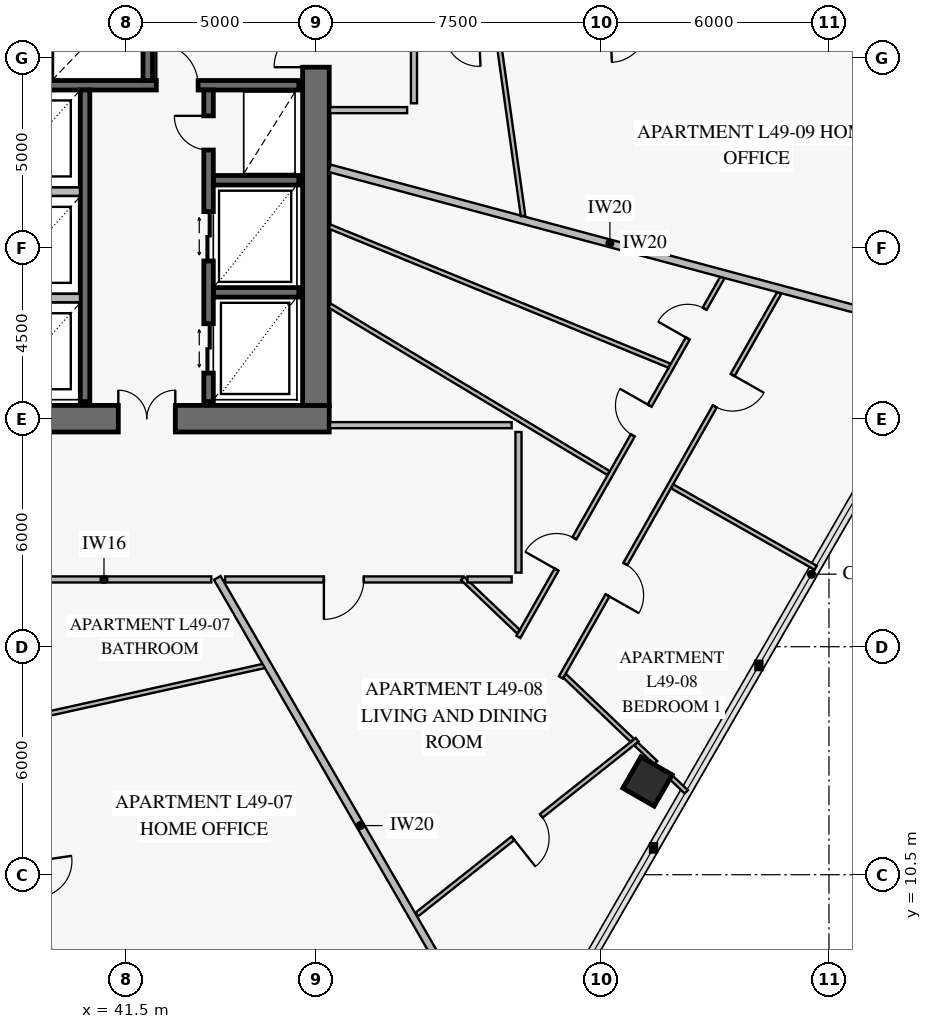
"""IFC4 building model, lengths in metres.
Left out: names, types, materials, properties, quantities, classifications, styles, units other than length and angle.
Written with IfcOpenShell. Run it as: python <this file> out.ifc"""

import sys

from ifc_helpers import new_model, si_unit, direction, frame, frame_2d, origin, origin_2d, place, context, subcontext, project, spatial, rectangle, extrude, element, fill, save


model = new_model("IFC4")
c1 = context("Model", 3, precision=1e-05, world=origin(), true_north=direction((0.0, 1.0)))
c2 = subcontext(c1, "Body", "Model", "MODEL_VIEW")
j1 = project(units=[si_unit("LENGTHUNIT", "METRE"), si_unit("PLANEANGLEUNIT", "RADIAN")], contexts=[c1])
p1 = place(None, origin())
s1 = spatial("IfcSite", under=j1, at=p1, CompositionType="ELEMENT")
p2 = place(p1, origin())
s2 = spatial("IfcBuilding", under=s1, at=p2, CompositionType="ELEMENT")
p3 = place(p2, frame((0.0, 0.0, 196.0)))
s3 = spatial("IfcBuildingStorey", under=s2, at=p3, CompositionType="ELEMENT", Elevation=196.0)
p4 = place(p3, frame((37.35, 22.5, 0.0), z_axis=(0.0, 0.0, 1.0), x_axis=(1.0, 0.0, 0.0)))
e1 = element("IfcWall", 1, at=p4, inside=s3, PredefinedType="SHEAR", context=c2, shape_type="SweptSolid", body=[
    extrude(rectangle(XDim=9.5, YDim=0.7, at=frame_2d((4.75, 0.0))), origin(), (0.0, 0.0, 1.0), 3.8),
])
p5 = place(p4, frame((3.95, 0.0, 0.0)))
e2 = element("IfcOpeningElement", 2, at=p5, cuts=e1, PredefinedType="OPENING", context=c2, shape_type="SweptSolid", body=[
    extrude(rectangle(XDim=1.5, YDim=2.15, at=frame_2d((0.75, 1.075))), frame((0.0, 0.362, 0.0), z_axis=(0.0, -1.0, 0.0), x_axis=(1.0, 0.0, 0.0)), (0.0, 0.0, 1.0), 0.724),
])
p6 = place(p3, frame((46.5, 22.85, 0.0), z_axis=(0.0, 0.0, 1.0), x_axis=(0.0, 1.0, 0.0)))
e3 = element("IfcWall", 3, at=p6, inside=s3, PredefinedType="SHEAR", context=c2, shape_type="SweptSolid", body=[
    extrude(rectangle(XDim=18.3, YDim=0.7, at=frame_2d((9.15, 0.0))), origin(), (0.0, 0.0, 1.0), 3.8),
])
p7 = place(p6, frame((8.9, 0.0, 0.0)))
e4 = element("IfcOpeningElement", 4, at=p7, cuts=e3, PredefinedType="OPENING", context=c2, shape_type="SweptSolid", body=[
    extrude(rectangle(XDim=1.1, YDim=2.15, at=frame_2d((0.55, 1.075))), frame((0.0, 0.362, 0.0), z_axis=(0.0, -1.0, 0.0), x_axis=(1.0, 0.0, 0.0)), (0.0, 0.0, 1.0), 0.724),
])
p8 = place(p3, frame((55.226, 12.953, 0.0), z_axis=(0.0, 0.0, 1.0), x_axis=(0.5, 0.866025403784, 0.0)))
e5 = element("IfcColumn", 5, at=p8, inside=s3, PredefinedType="COLUMN", context=c2, shape_type="SweptSolid", body=[
    extrude(rectangle(XDim=0.95, YDim=0.95, at=origin_2d()), origin(), (0.0, 0.0, 1.0), 3.55),
])
p9 = place(p3, frame((25.95, 31.275, 0.0), z_axis=(0.0, 0.0, 1.0), x_axis=(1.0, 0.0, 0.0)))
e6 = element("IfcWall", 6, at=p9, inside=s3, PredefinedType="SOLIDWALL", context=c2, shape_type="SweptSolid", body=[
    extrude(rectangle(XDim=20.1, YDim=0.25, at=frame_2d((10.05, 0.0))), origin(), (0.0, 0.0, 1.0), 3.8),
])
p10 = place(p9, frame((2.6, 0.0, 0.0)))
e7 = element("IfcOpeningElement", 7, at=p10, cuts=e6, PredefinedType="OPENING", context=c2, shape_type="SweptSolid", body=[
    extrude(rectangle(XDim=1.1, YDim=2.15, at=frame_2d((0.55, 1.075))), frame((0.0, 0.137, 0.0), z_axis=(0.0, -1.0, 0.0), x_axis=(1.0, 0.0, 0.0)), (0.0, 0.0, 1.0), 0.274),
])
p11 = place(p9, frame((10.6, 0.0, 0.0)))
e8 = element("IfcOpeningElement", 8, at=p11, cuts=e6, PredefinedType="OPENING", context=c2, shape_type="SweptSolid", body=[
    extrude(rectangle(XDim=1.1, YDim=2.15, at=frame_2d((0.55, 1.075))), frame((0.0, 0.137, 0.0), z_axis=(0.0, -1.0, 0.0), x_axis=(1.0, 0.0, 0.0)), (0.0, 0.0, 1.0), 0.274),
])
p12 = place(p9, frame((16.35, 0.0, 0.0)))
e9 = element("IfcOpeningElement", 9, at=p12, cuts=e6, PredefinedType="OPENING", context=c2, shape_type="SweptSolid", body=[
    extrude(rectangle(XDim=1.1, YDim=2.15, at=frame_2d((0.55, 1.075))), frame((0.0, 0.137, 0.0), z_axis=(0.0, -1.0, 0.0), x_axis=(1.0, 0.0, 0.0)), (0.0, 0.0, 1.0), 0.274),
])
p13 = place(p3, frame((42.075, 31.4, 0.0), z_axis=(0.0, 0.0, 1.0), x_axis=(0.0, 1.0, 0.0)))
e10 = element("IfcWall", 10, at=p13, inside=s3, PredefinedType="SOLIDWALL", context=c2, shape_type="SweptSolid", body=[
    extrude(rectangle(XDim=9.7, YDim=0.25, at=frame_2d((4.85, 0.0))), origin(), (0.0, 0.0, 1.0), 3.8),
])
p14 = place(p3, frame((40.425, 22.95, 0.0), z_axis=(0.0, 0.0, 1.0), x_axis=(0.0, 1.0, 0.0)))
e11 = element("IfcWall", 11, at=p14, inside=s3, PredefinedType="SOLIDWALL", context=c2, shape_type="SweptSolid", body=[
    extrude(rectangle(XDim=8.2, YDim=0.25, at=frame_2d((4.1, 0.0))), origin(), (0.0, 0.0, 1.0), 3.8),
])
for number, where, z_axis, x_axis in (
    (12, (43.8, 25.825, 0.0), (0.0, 0.0, 1.0), (1.0, 0.0, 0.0)),
    (13, (43.8, 28.775, 0.0), (0.0, 0.0, 1.0), (1.0, 0.0, 0.0)),
):
    element("IfcWall", number, at=place(p3, frame(where, z_axis=z_axis, x_axis=x_axis)), inside=s3, PredefinedType="SOLIDWALL", context=c2, shape_type="SweptSolid", body=[
        extrude(rectangle(XDim=2.25, YDim=0.25, at=frame_2d((1.125, 0.0))), origin(), (0.0, 0.0, 1.0), 3.8),
    ])
p15 = place(p3, frame((43.675, 22.95, 0.0), z_axis=(0.0, 0.0, 1.0), x_axis=(0.0, 1.0, 0.0)))
e14 = element("IfcWall", 14, at=p15, inside=s3, PredefinedType="SOLIDWALL", context=c2, shape_type="SweptSolid", body=[
    extrude(rectangle(XDim=8.2, YDim=0.25, at=frame_2d((4.1, 0.0))), origin(), (0.0, 0.0, 1.0), 3.8),
])
p16 = place(p15, frame((0.75, 0.0, 0.0)))
e15 = element("IfcOpeningElement", 15, at=p16, cuts=e14, PredefinedType="OPENING", context=c2, shape_type="SweptSolid", body=[
    extrude(rectangle(XDim=1.3, YDim=2.3, at=frame_2d((0.65, 1.15))), frame((0.0, 0.137, 0.0), z_axis=(0.0, -1.0, 0.0), x_axis=(1.0, 0.0, 0.0)), (0.0, 0.0, 1.0), 0.274),
])
p17 = place(p15, frame((3.7, 0.0, 0.0)))
e16 = element("IfcOpeningElement", 16, at=p17, cuts=e14, PredefinedType="OPENING", context=c2, shape_type="SweptSolid", body=[
    extrude(rectangle(XDim=1.3, YDim=2.3, at=frame_2d((0.65, 1.15))), frame((0.0, 0.137, 0.0), z_axis=(0.0, -1.0, 0.0), x_axis=(1.0, 0.0, 0.0)), (0.0, 0.0, 1.0), 0.274),
])
p18 = place(p15, frame((6.62, 0.0, 0.0)))
e17 = element("IfcOpeningElement", 17, at=p18, cuts=e14, PredefinedType="OPENING", context=c2, shape_type="SweptSolid", body=[
    extrude(rectangle(XDim=0.9, YDim=2.1, at=frame_2d((0.45, 1.05))), frame((0.0, 0.137, 0.0), z_axis=(0.0, -1.0, 0.0), x_axis=(1.0, 0.0, 0.0)), (0.0, 0.0, 1.0), 0.274),
])
p19 = place(p3, frame((38.588, 14.517, 0.0), z_axis=(0.0, 0.0, 1.0), x_axis=(0.146416974586, -0.989222962508, 0.0)))
e18 = element("IfcWall", 18, at=p19, inside=s3, PredefinedType="PARTITIONING", context=c2, shape_type="SweptSolid", body=[
    extrude(rectangle(XDim=8.399, YDim=0.12, at=frame_2d((4.199, 0.0))), origin(), (0.0, 0.0, 1.0), 3.15),
])
p20 = place(p19, frame((3.699, 0.0, 0.0)))
e19 = element("IfcOpeningElement", 19, at=p20, cuts=e18, PredefinedType="OPENING", context=c2, shape_type="SweptSolid", body=[
    extrude(rectangle(XDim=0.95, YDim=2.1, at=frame_2d((0.475, 1.05))), frame((0.0, 0.072, 0.0), z_axis=(0.0, -1.0, 0.0), x_axis=(1.0, 0.0, 0.0)), (0.0, 0.0, 1.0), 0.144),
])
p21 = place(p3, frame((49.162, 9.458, 0.0), z_axis=(0.0, 0.0, 1.0), x_axis=(0.783468844614, 0.621431065782, 0.0)))
e20 = element("IfcWall", 20, at=p21, inside=s3, PredefinedType="PARTITIONING", context=c2, shape_type="SweptSolid", body=[
    extrude(rectangle(XDim=7.392, YDim=0.12, at=frame_2d((3.696, 0.0))), origin(), (0.0, 0.0, 1.0), 2.87),
])
p22 = place(p21, frame((3.221, 0.0, 0.0)))
e21 = element("IfcOpeningElement", 21, at=p22, cuts=e20, PredefinedType="OPENING", context=c2, shape_type="SweptSolid", body=[
    extrude(rectangle(XDim=0.95, YDim=2.1, at=frame_2d((0.475, 1.05))), frame((0.0, 0.072, 0.0), z_axis=(0.0, -1.0, 0.0), x_axis=(1.0, 0.0, 0.0)), (0.0, 0.0, 1.0), 0.144),
])
p23 = place(p3, frame((51.827, 16.758, 0.0), z_axis=(0.0, 0.0, 1.0), x_axis=(0.493634405262, 0.869669519957, 0.0)))
e22 = element("IfcWall", 22, at=p23, inside=s3, PredefinedType="PARTITIONING", context=c2, shape_type="SweptSolid", body=[
    extrude(rectangle(XDim=10.885, YDim=0.12, at=frame_2d((5.442, 0.0))), origin(), (0.0, 0.0, 1.0), 2.9),
])
p24 = place(p23, frame((2.036, 0.0, 0.0)))
e23 = element("IfcOpeningElement", 23, at=p24, cuts=e22, PredefinedType="OPENING", context=c2, shape_type="SweptSolid", body=[
    extrude(rectangle(XDim=0.95, YDim=2.1, at=frame_2d((0.475, 1.05))), frame((0.0, 0.072, 0.0), z_axis=(0.0, -1.0, 0.0), x_axis=(1.0, 0.0, 0.0)), (0.0, 0.0, 1.0), 0.144),
])
p25 = place(p23, frame((6.098, 0.0, 0.0)))
e24 = element("IfcOpeningElement", 24, at=p25, cuts=e22, PredefinedType="OPENING", context=c2, shape_type="SweptSolid", body=[
    extrude(rectangle(XDim=0.9, YDim=2.1, at=frame_2d((0.45, 1.05))), frame((0.0, 0.072, 0.0), z_axis=(0.0, -1.0, 0.0), x_axis=(1.0, 0.0, 0.0)), (0.0, 0.0, 1.0), 0.144),
])
p26 = place(p23, frame((9.029, 0.0, 0.0)))
e25 = element("IfcOpeningElement", 25, at=p26, cuts=e22, PredefinedType="OPENING", context=c2, shape_type="SweptSolid", body=[
    extrude(rectangle(XDim=0.9, YDim=2.1, at=frame_2d((0.45, 1.05))), frame((0.0, 0.072, 0.0), z_axis=(0.0, -1.0, 0.0), x_axis=(1.0, 0.0, 0.0)), (0.0, 0.0, 1.0), 0.144),
])
p27 = place(p3, frame((52.946, 15.691, 0.0), z_axis=(0.0, 0.0, 1.0), x_axis=(0.493647118533, 0.869662303635, 0.0)))
e26 = element("IfcWall", 26, at=p27, inside=s3, PredefinedType="PARTITIONING", context=c2, shape_type="SweptSolid", body=[
    extrude(rectangle(XDim=11.637, YDim=0.12, at=frame_2d((5.819, 0.0))), origin(), (0.0, 0.0, 1.0), 2.9),
])
p28 = place(p27, frame((2.484, 0.0, 0.0)))
e27 = element("IfcOpeningElement", 27, at=p28, cuts=e26, PredefinedType="OPENING", context=c2, shape_type="SweptSolid", body=[
    extrude(rectangle(XDim=0.95, YDim=2.1, at=frame_2d((0.475, 1.05))), frame((0.0, 0.072, 0.0), z_axis=(0.0, -1.0, 0.0), x_axis=(1.0, 0.0, 0.0)), (0.0, 0.0, 1.0), 0.144),
])
p29 = place(p27, frame((8.203, 0.0, 0.0)))
e28 = element("IfcOpeningElement", 28, at=p29, cuts=e26, PredefinedType="OPENING", context=c2, shape_type="SweptSolid", body=[
    extrude(rectangle(XDim=0.95, YDim=2.1, at=frame_2d((0.475, 1.05))), frame((0.0, 0.072, 0.0), z_axis=(0.0, -1.0, 0.0), x_axis=(1.0, 0.0, 0.0)), (0.0, 0.0, 1.0), 0.144),
])
p30 = place(p3, frame((44.111, 18.27, 0.0), z_axis=(0.0, 0.0, 1.0), x_axis=(1.0, 0.0, 0.0)))
e29 = element("IfcWall", 29, at=p30, inside=s3, PredefinedType="PARTITIONING", context=c2, shape_type="SweptSolid", body=[
    extrude(rectangle(XDim=6.248, YDim=0.16, at=frame_2d((3.124, 0.0))), origin(), (0.0, 0.0, 1.0), 2.9),
])
p31 = place(p30, frame((2.599, 0.0, 0.0)))
e30 = element("IfcOpeningElement", 30, at=p31, cuts=e29, PredefinedType="OPENING", context=c2, shape_type="SweptSolid", body=[
    extrude(rectangle(XDim=1.05, YDim=2.15, at=frame_2d((0.525, 1.075))), frame((0.0, 0.092, 0.0), z_axis=(0.0, -1.0, 0.0), x_axis=(1.0, 0.0, 0.0)), (0.0, 0.0, 1.0), 0.184),
])
for number, where, z_axis, x_axis in (
    (31, (38.008, 25.675, 0.0), (0.0, 0.0, 1.0), (1.0, 0.0, 0.0)),
    (32, (38.008, 28.475, 0.0), (0.0, 0.0, 1.0), (1.0, 0.0, 0.0)),
):
    element("IfcWall", number, at=place(p3, frame(where, z_axis=z_axis, x_axis=x_axis)), inside=s3, PredefinedType="PARTITIONING", context=c2, shape_type="SweptSolid", body=[
        extrude(rectangle(XDim=2.284, YDim=0.22, at=frame_2d((1.142, 0.0))), origin(), (0.0, 0.0, 1.0), 3.55),
    ])
p32 = place(p3, frame((38.651, 14.557, 0.0), z_axis=(0.0, 0.0, 1.0), x_axis=(0.976292815714, 0.21645400894, 0.0)))
e33 = element("IfcWall", 33, at=p32, inside=s3, PredefinedType="PARTITIONING", context=c2, shape_type="SweptSolid", body=[
    extrude(rectangle(XDim=6.674, YDim=0.12, at=frame_2d((3.337, 0.0))), origin(), (0.0, 0.0, 1.0), 2.9),
])
p33 = place(p3, frame((43.904, 18.31, 0.0), z_axis=(0.0, 0.0, 1.0), x_axis=(0.500007038605, -0.866021340006, 0.0)))
e34 = element("IfcWall", 34, at=p33, inside=s3, PredefinedType="PARTITIONING", context=c2, shape_type="SweptSolid", body=[
    extrude(rectangle(XDim=15.05, YDim=0.2, at=frame_2d((7.525, 0.0))), origin(), (0.0, 0.0, 1.0), 2.87),
])
p34 = place(p3, frame((46.858, 25.479, 0.0), z_axis=(0.0, 0.0, 1.0), x_axis=(0.857273931948, -0.514860569089, 0.0)))
e35 = element("IfcWall", 35, at=p34, inside=s3, PredefinedType="PARTITIONING", context=c2, shape_type="SweptSolid", body=[
    extrude(rectangle(XDim=8.561, YDim=0.12, at=frame_2d((4.281, 0.0))), origin(), (0.0, 0.0, 1.0), 3.15),
])
p35 = place(p3, frame((46.858, 27.556, 0.0), z_axis=(0.0, 0.0, 1.0), x_axis=(0.925490196585, -0.378771561795, 0.0)))
e36 = element("IfcWall", 36, at=p35, inside=s3, PredefinedType="PARTITIONING", context=c2, shape_type="SweptSolid", body=[
    extrude(rectangle(XDim=9.663, YDim=0.12, at=frame_2d((4.831, 0.0))), origin(), (0.0, 0.0, 1.0), 3.15),
])
p36 = place(p3, frame((55.877, 20.717, 0.0), z_axis=(0.0, 0.0, 1.0), x_axis=(0.869673507185, -0.493627380623, 0.0)))
e37 = element("IfcWall", 37, at=p36, inside=s3, PredefinedType="PARTITIONING", context=c2, shape_type="SweptSolid", body=[
    extrude(rectangle(XDim=4.337, YDim=0.12, at=frame_2d((2.169, 0.0))), origin(), (0.0, 0.0, 1.0), 2.87),
])
p37 = place(p3, frame((50.359, 18.298, 0.0), z_axis=(0.0, 0.0, 1.0), x_axis=(0.723451106681, -0.690375619675, 0.0)))
e38 = element("IfcWall", 38, at=p37, inside=s3, PredefinedType="PARTITIONING", context=c2, shape_type="SweptSolid", body=[
    extrude(rectangle(XDim=2.03, YDim=0.12, at=frame_2d((1.015, 0.0))), origin(), (0.0, 0.0, 1.0), 3.15),
])
p38 = place(p3, frame((53.048, 15.732, 0.0), z_axis=(0.0, 0.0, 1.0), x_axis=(0.723414212857, -0.690414278992, 0.0)))
e39 = element("IfcWall", 39, at=p38, inside=s3, PredefinedType="PARTITIONING", context=c2, shape_type="SweptSolid", body=[
    extrude(rectangle(XDim=2.456, YDim=0.12, at=frame_2d((1.228, 0.0))), origin(), (0.0, 0.0, 1.0), 3.55),
])
p39 = place(p3, frame((54.924, 13.941, 0.0), z_axis=(0.0, 0.0, 1.0), x_axis=(0.723503085089, -0.690321146907, 0.0)))
e40 = element("IfcWall", 40, at=p39, inside=s3, PredefinedType="PARTITIONING", context=c2, shape_type="SweptSolid", body=[
    extrude(rectangle(XDim=0.714, YDim=0.12, at=frame_2d((0.357, 0.0))), origin(), (0.0, 0.0, 1.0), 2.87),
])
p40 = place(p3, frame((55.72, 13.181, 0.0), z_axis=(0.0, 0.0, 1.0), x_axis=(0.723584936245, -0.690235351195, 0.0)))
e41 = element("IfcWall", 41, at=p40, inside=s3, PredefinedType="PARTITIONING", context=c2, shape_type="SweptSolid", body=[
    extrude(rectangle(XDim=0.725, YDim=0.12, at=frame_2d((0.362, 0.0))), origin(), (0.0, 0.0, 1.0), 3.55),
])
p41 = place(p3, frame((46.858, 29.091, 0.0), z_axis=(0.0, 0.0, 1.0), x_axis=(0.965927861862, -0.25881144812, 0.0)))
e42 = element("IfcWall", 42, at=p41, inside=s3, PredefinedType="PARTITIONING", context=c2, shape_type="SweptSolid", body=[
    extrude(rectangle(XDim=15.275, YDim=0.2, at=frame_2d((7.638, 0.0))), origin(), (0.0, 0.0, 1.0), 2.9),
])
p42 = place(p3, frame((51.95, 27.838, 0.0), z_axis=(0.0, 0.0, 1.0), x_axis=(-0.139165856078, 0.990269086916, 0.0)))
e43 = element("IfcWall", 43, at=p42, inside=s3, PredefinedType="PARTITIONING", context=c2, shape_type="SweptSolid", body=[
    extrude(rectangle(XDim=4.835, YDim=0.12, at=frame_2d((2.417, 0.0))), origin(), (0.0, 0.0, 1.0), 3.55),
])
p43 = place(p3, frame((38.101, 18.27, 0.0), z_axis=(0.0, 0.0, 1.0), x_axis=(1.0, 0.0, 0.0)))
e44 = element("IfcWall", 44, at=p43, inside=s3, PredefinedType="PARTITIONING", context=c2, shape_type="SweptSolid", body=[
    extrude(rectangle(XDim=5.644, YDim=0.16, at=frame_2d((2.822, 0.0))), origin(), (0.0, 0.0, 1.0), 2.9),
])
p44 = place(p3, frame((51.65, 22.33, 0.0), z_axis=(0.0, 0.0, 1.0), x_axis=(-1.0, 0.0, 0.0)))
e45 = element("IfcWall", 45, at=p44, inside=s3, PredefinedType="PARTITIONING", context=c2, shape_type="SweptSolid", body=[
    extrude(rectangle(XDim=4.78, YDim=0.16, at=frame_2d((2.39, 0.0))), origin(), (0.0, 0.0, 1.0), 3.55),
])
p45 = place(p3, frame((51.83, 18.45, 0.0), z_axis=(0.0, 0.0, 1.0), x_axis=(0.0, 1.0, 0.0)))
e46 = element("IfcWall", 46, at=p45, inside=s3, PredefinedType="PARTITIONING", context=c2, shape_type="SweptSolid", body=[
    extrude(rectangle(XDim=3.7, YDim=0.16, at=frame_2d((1.85, 0.0))), origin(), (0.0, 0.0, 1.0), 3.15),
])
p46 = place(p3, frame((50.486, 18.27, 0.0), z_axis=(0.0, 0.0, 1.0), x_axis=(1.0, 0.0, 0.0)))
e47 = element("IfcWall", 47, at=p46, inside=s3, PredefinedType="PARTITIONING", context=c2, shape_type="SweptSolid", body=[
    extrude(rectangle(XDim=1.164, YDim=0.16, at=frame_2d((0.582, 0.0))), origin(), (0.0, 0.0, 1.0), 3.15),
])
p47 = place(p3, frame((46.87, 30.62, 0.0), z_axis=(0.0, 0.0, 1.0), x_axis=(1.0, 0.0, 0.0)))
e48 = element("IfcWall", 48, at=p47, inside=s3, PredefinedType="PARTITIONING", context=c2, shape_type="SweptSolid", body=[
    extrude(rectangle(XDim=2.03, YDim=0.16, at=frame_2d((1.015, 0.0))), origin(), (0.0, 0.0, 1.0), 3.55),
])
p48 = place(p3, frame((49.08, 30.8, 0.0), z_axis=(0.0, 0.0, 1.0), x_axis=(0.0, 1.0, 0.0)))
e49 = element("IfcWall", 49, at=p48, inside=s3, PredefinedType="PARTITIONING", context=c2, shape_type="SweptSolid", body=[
    extrude(rectangle(XDim=1.726, YDim=0.16, at=frame_2d((0.863, 0.0))), origin(), (0.0, 0.0, 1.0), 3.55),
])
p49 = place(p7, origin())
e50 = element("IfcDoor", 50, at=p49, inside=s3, OperationType="SINGLE_SWING_LEFT", PredefinedType="USERDEFINED", context=c2, shape_type="SweptSolid", body=[
    extrude(rectangle(XDim=1.1, YDim=2.15, at=frame_2d((0.55, 1.075))), frame((0.0, 0.025, 0.0), z_axis=(0.0, -1.0, 0.0), x_axis=(1.0, 0.0, 0.0)), (0.0, 0.0, 1.0), 0.05),
])
fill(e4, e50)
p50 = place(p5, origin())
e51 = element("IfcDoor", 51, at=p50, inside=s3, OperationType="DOUBLE_DOOR_SINGLE_SWING", PredefinedType="DOOR", context=c2, shape_type="SweptSolid", body=[
    extrude(rectangle(XDim=1.5, YDim=2.15, at=frame_2d((0.75, 1.075))), frame((0.0, 0.025, 0.0), z_axis=(0.0, -1.0, 0.0), x_axis=(1.0, 0.0, 0.0)), (0.0, 0.0, 1.0), 0.05),
])
fill(e2, e51)
p51 = place(p12, origin())
e52 = element("IfcDoor", 52, at=p51, inside=s3, OperationType="SINGLE_SWING_LEFT", PredefinedType="USERDEFINED", context=c2, shape_type="SweptSolid", body=[
    extrude(rectangle(XDim=1.1, YDim=2.15, at=frame_2d((0.55, 1.075))), frame((0.0, 0.025, 0.0), z_axis=(0.0, -1.0, 0.0), x_axis=(1.0, 0.0, 0.0)), (0.0, 0.0, 1.0), 0.05),
])
fill(e9, e52)
p52 = place(p16, origin())
e53 = element("IfcDoor", 53, at=p52, inside=s3, OperationType="DOUBLE_DOOR_SLIDING", PredefinedType="DOOR", context=c2, shape_type="SweptSolid", body=[
    extrude(rectangle(XDim=1.3, YDim=2.3, at=frame_2d((0.65, 1.15))), frame((0.0, 0.025, 0.0), z_axis=(0.0, -1.0, 0.0), x_axis=(1.0, 0.0, 0.0)), (0.0, 0.0, 1.0), 0.05),
])
fill(e15, e53)
p53 = place(p17, origin())
e54 = element("IfcDoor", 54, at=p53, inside=s3, OperationType="DOUBLE_DOOR_SLIDING", PredefinedType="DOOR", context=c2, shape_type="SweptSolid", body=[
    extrude(rectangle(XDim=1.3, YDim=2.3, at=frame_2d((0.65, 1.15))), frame((0.0, 0.025, 0.0), z_axis=(0.0, -1.0, 0.0), x_axis=(1.0, 0.0, 0.0)), (0.0, 0.0, 1.0), 0.05),
])
fill(e16, e54)
p54 = place(p18, origin())
e55 = element("IfcDoor", 55, at=p54, inside=s3, OperationType="SINGLE_SWING_RIGHT", PredefinedType="DOOR", context=c2, shape_type="SweptSolid", body=[
    extrude(rectangle(XDim=0.9, YDim=2.1, at=frame_2d((0.45, 1.05))), frame((0.0, 0.025, 0.0), z_axis=(0.0, -1.0, 0.0), x_axis=(1.0, 0.0, 0.0)), (0.0, 0.0, 1.0), 0.05),
])
fill(e17, e55)
p55 = place(p22, frame((0.95, 0.0, 0.0), z_axis=(0.0, 0.0, 1.0), x_axis=(-1.0, 0.0, 0.0)))
e56 = element("IfcDoor", 56, at=p55, inside=s3, OperationType="SINGLE_SWING_RIGHT", PredefinedType="DOOR", context=c2, shape_type="SweptSolid", body=[
    extrude(rectangle(XDim=0.95, YDim=2.1, at=frame_2d((0.475, 1.05))), frame((0.0, 0.025, 0.0), z_axis=(0.0, -1.0, 0.0), x_axis=(1.0, 0.0, 0.0)), (0.0, 0.0, 1.0), 0.05),
])
fill(e21, e56)
p56 = place(p24, origin())
e57 = element("IfcDoor", 57, at=p56, inside=s3, OperationType="SINGLE_SWING_LEFT", PredefinedType="DOOR", context=c2, shape_type="SweptSolid", body=[
    extrude(rectangle(XDim=0.95, YDim=2.1, at=frame_2d((0.475, 1.05))), frame((0.0, 0.025, 0.0), z_axis=(0.0, -1.0, 0.0), x_axis=(1.0, 0.0, 0.0)), (0.0, 0.0, 1.0), 0.05),
])
fill(e23, e57)
p57 = place(p25, origin())
e58 = element("IfcDoor", 58, at=p57, inside=s3, OperationType="SINGLE_SWING_RIGHT", PredefinedType="DOOR", context=c2, shape_type="SweptSolid", body=[
    extrude(rectangle(XDim=0.9, YDim=2.1, at=frame_2d((0.45, 1.05))), frame((0.0, 0.025, 0.0), z_axis=(0.0, -1.0, 0.0), x_axis=(1.0, 0.0, 0.0)), (0.0, 0.0, 1.0), 0.05),
])
fill(e24, e58)
p58 = place(p26, origin())
e59 = element("IfcDoor", 59, at=p58, inside=s3, OperationType="SINGLE_SWING_LEFT", PredefinedType="DOOR", context=c2, shape_type="SweptSolid", body=[
    extrude(rectangle(XDim=0.9, YDim=2.1, at=frame_2d((0.45, 1.05))), frame((0.0, 0.025, 0.0), z_axis=(0.0, -1.0, 0.0), x_axis=(1.0, 0.0, 0.0)), (0.0, 0.0, 1.0), 0.05),
])
fill(e25, e59)
p59 = place(p28, frame((0.95, 0.0, 0.0), z_axis=(0.0, 0.0, 1.0), x_axis=(-1.0, 0.0, 0.0)))
e60 = element("IfcDoor", 60, at=p59, inside=s3, OperationType="SINGLE_SWING_RIGHT", PredefinedType="DOOR", context=c2, shape_type="SweptSolid", body=[
    extrude(rectangle(XDim=0.95, YDim=2.1, at=frame_2d((0.475, 1.05))), frame((0.0, 0.025, 0.0), z_axis=(0.0, -1.0, 0.0), x_axis=(1.0, 0.0, 0.0)), (0.0, 0.0, 1.0), 0.05),
])
fill(e27, e60)
p60 = place(p29, frame((0.95, 0.0, 0.0), z_axis=(0.0, 0.0, 1.0), x_axis=(-1.0, 0.0, 0.0)))
e61 = element("IfcDoor", 61, at=p60, inside=s3, OperationType="SINGLE_SWING_LEFT", PredefinedType="DOOR", context=c2, shape_type="SweptSolid", body=[
    extrude(rectangle(XDim=0.95, YDim=2.1, at=frame_2d((0.475, 1.05))), frame((0.0, 0.025, 0.0), z_axis=(0.0, -1.0, 0.0), x_axis=(1.0, 0.0, 0.0)), (0.0, 0.0, 1.0), 0.05),
])
fill(e28, e61)
p61 = place(p31, frame((1.05, 0.0, 0.0), z_axis=(0.0, 0.0, 1.0), x_axis=(-1.0, 0.0, 0.0)))
e62 = element("IfcDoor", 62, at=p61, inside=s3, OperationType="SINGLE_SWING_RIGHT", PredefinedType="DOOR", context=c2, shape_type="SweptSolid", body=[
    extrude(rectangle(XDim=1.05, YDim=2.15, at=frame_2d((0.525, 1.075))), frame((0.0, 0.025, 0.0), z_axis=(0.0, -1.0, 0.0), x_axis=(1.0, 0.0, 0.0)), (0.0, 0.0, 1.0), 0.05),
])
fill(e30, e62)
save(model, sys.argv[1])
